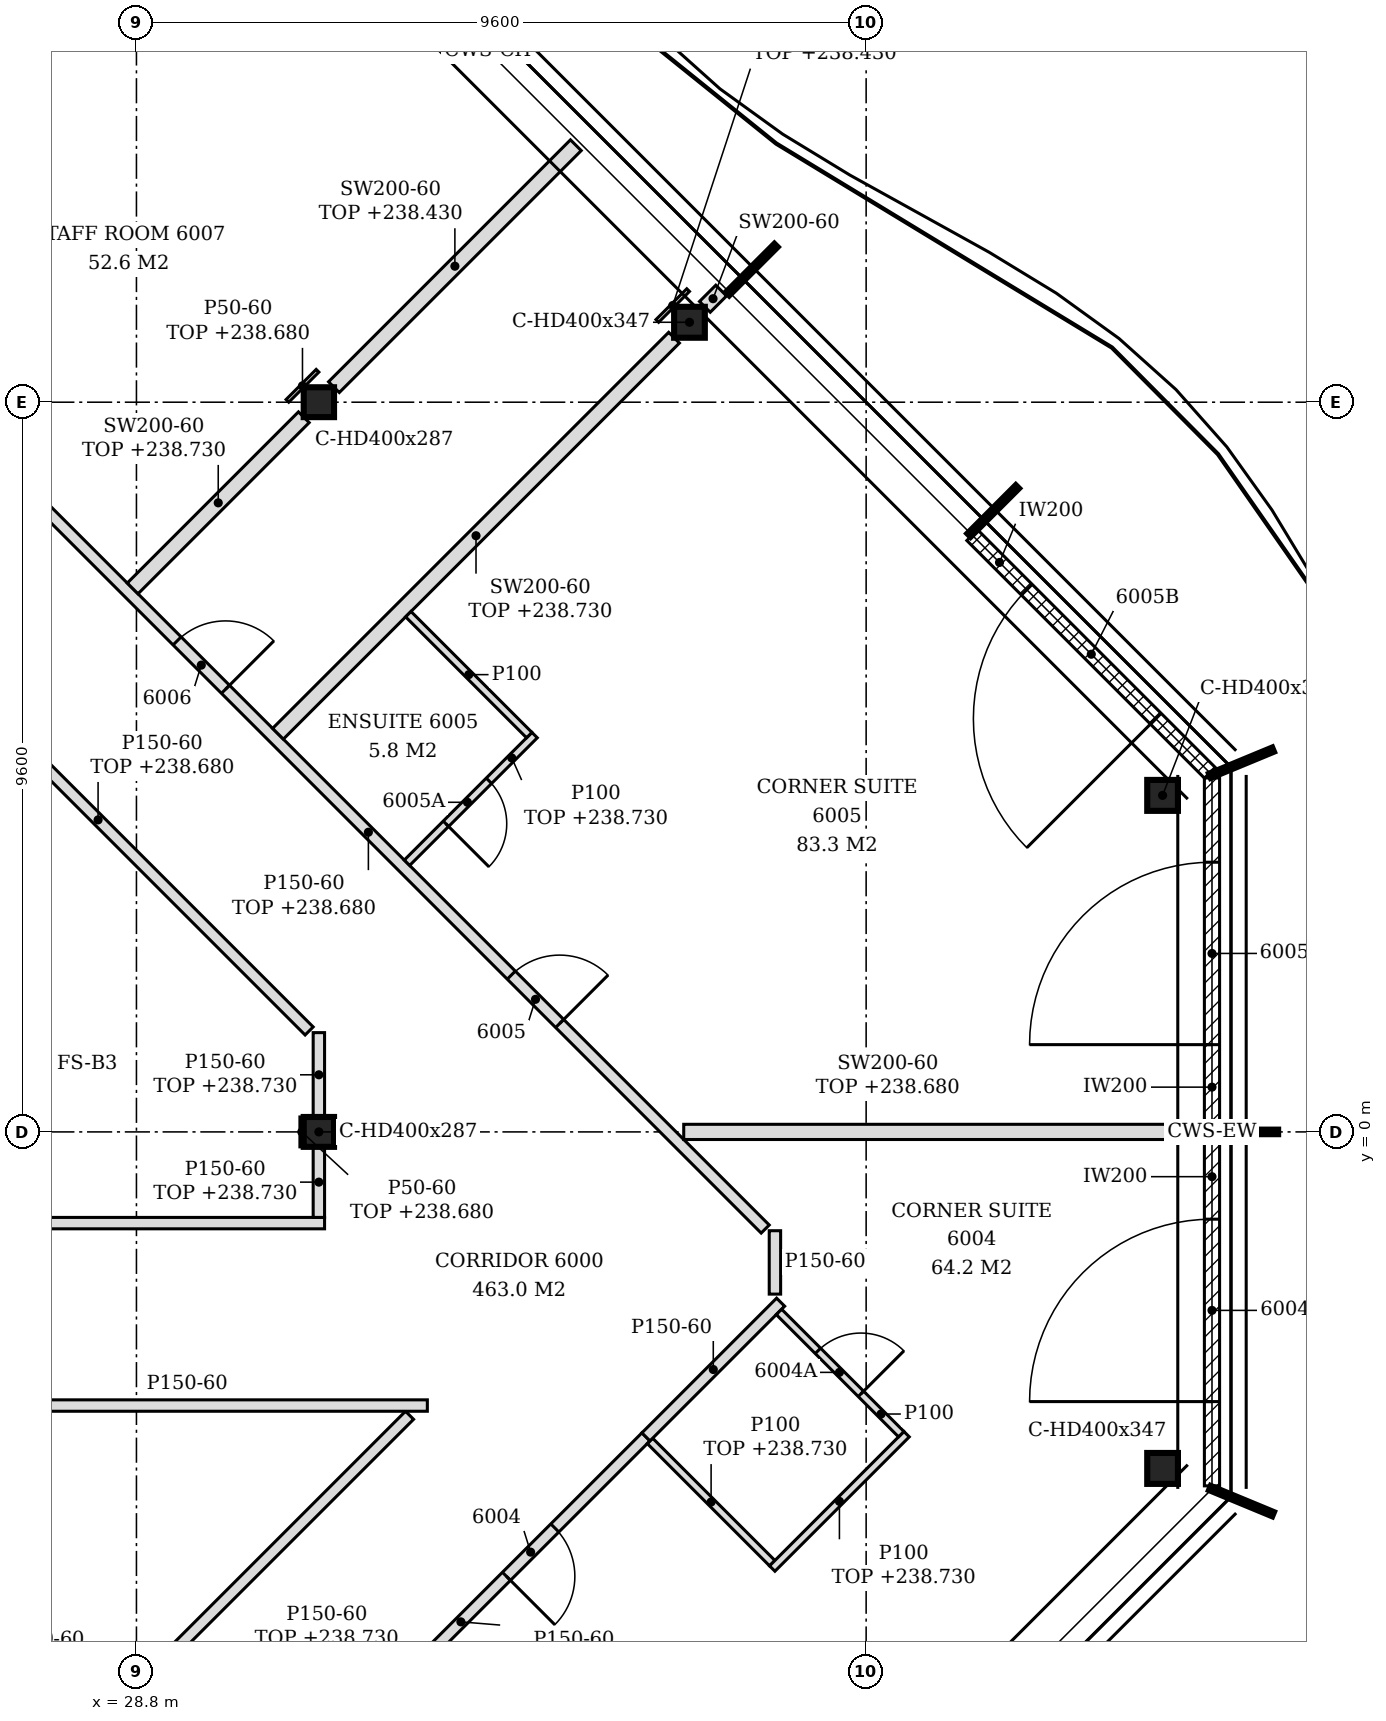
"""IFC4 building model, lengths in metres.
Left out: names, types, materials, properties, quantities, classifications, styles, units other than length and angle.
Written with IfcOpenShell. Run it as: python <this file> out.ifc"""

import sys

from ifc_helpers import new_model, si_unit, direction, frame, frame_2d, origin, origin_2d, place, context, subcontext, project, spatial, polyline, rectangle, i_section, outline, extrude, element, fill, save


model = new_model("IFC4")
c1 = context("Model", 3, precision=1e-05, world=origin(), true_north=direction((0.0, 1.0)))
c2 = subcontext(c1, "Body", "Model", "MODEL_VIEW")
j1 = project(units=[si_unit("LENGTHUNIT", "METRE"), si_unit("PLANEANGLEUNIT", "RADIAN")], contexts=[c1])
p1 = place(None, origin())
s1 = spatial("IfcSite", under=j1, at=p1, CompositionType="ELEMENT")
p2 = place(p1, origin())
s2 = spatial("IfcBuilding", under=s1, at=p2, CompositionType="ELEMENT")
p3 = place(p2, frame((0.0, 0.0, 235.8)))
s3 = spatial("IfcBuildingStorey", under=s2, at=p3, CompositionType="ELEMENT", Elevation=235.8)
for number, where, z_axis, x_axis in (
    (1, (42.3, -4.427, -0.15), (0.0, 0.0, 1.0), (1.0, 0.0, 0.0)),
    (2, (42.3, 4.427, -0.15), (0.0, 0.0, 1.0), (1.0, 0.0, 0.0)),
    (3, (36.076, 10.652, -0.15), (0.0, 0.0, 1.0), (1.0, 0.0, 0.0)),
):
    element("IfcColumn", number, at=place(p3, frame(where, z_axis=z_axis, x_axis=x_axis)), inside=s3, PredefinedType="COLUMN", context=c2, shape_type="SweptSolid", body=[
        extrude(i_section(OverallWidth=0.404, OverallDepth=0.407, WebThickness=0.027, FlangeThickness=0.044, FilletRadius=0.015, at=origin_2d()), origin(), (0.0, 0.0, 1.0), 3.6),
    ])
for number, where, z_axis, x_axis in (
    (4, (31.2, 0.0, -0.15), (0.0, 0.0, 1.0), (1.0, 0.0, 0.0)),
    (5, (31.2, 9.6, -0.15), (0.0, 0.0, 1.0), (1.0, 0.0, 0.0)),
):
    element("IfcColumn", number, at=place(p3, frame(where, z_axis=z_axis, x_axis=x_axis)), inside=s3, PredefinedType="COLUMN", context=c2, shape_type="SweptSolid", body=[
        extrude(i_section(OverallWidth=0.399, OverallDepth=0.393, WebThickness=0.023, FlangeThickness=0.037, FilletRadius=0.015, at=origin_2d()), origin(), (0.0, 0.0, 1.0), 3.6),
    ])
p4 = place(p3, frame((42.95, -4.656, 0.0), z_axis=(0.0, 0.0, 1.0), x_axis=(0.0, 1.0, 0.0)))
e6 = element("IfcWall", 6, at=p4, inside=s3, PredefinedType="NOTDEFINED", context=c2, shape_type="SweptSolid", body=[
    extrude(rectangle(XDim=4.626, YDim=0.2, at=frame_2d((2.313, 0.0))), origin(), (0.0, 0.0, 1.0), 3.45),
])
p5 = place(p4, frame((1.108, 0.0, 0.0)))
e7 = element("IfcOpeningElement", 7, at=p5, cuts=e6, PredefinedType="OPENING", context=c2, shape_type="SweptSolid", body=[
    extrude(rectangle(XDim=2.4, YDim=2.4, at=frame_2d((1.2, 1.2))), frame((0.0, 0.11, 0.0), z_axis=(0.0, -1.0, 0.0), x_axis=(1.0, 0.0, 0.0)), (0.0, 0.0, 1.0), 0.22),
])
p6 = place(p3, frame((42.95, 0.03, 0.0), z_axis=(0.0, 0.0, 1.0), x_axis=(0.0, 1.0, 0.0)))
e8 = element("IfcWall", 8, at=p6, inside=s3, PredefinedType="NOTDEFINED", context=c2, shape_type="SweptSolid", body=[
    extrude(rectangle(XDim=4.626, YDim=0.2, at=frame_2d((2.313, 0.0))), origin(), (0.0, 0.0, 1.0), 3.45),
])
p7 = place(p6, frame((1.118, 0.0, 0.0)))
e9 = element("IfcOpeningElement", 9, at=p7, cuts=e8, PredefinedType="OPENING", context=c2, shape_type="SweptSolid", body=[
    extrude(rectangle(XDim=2.4, YDim=2.4, at=frame_2d((1.2, 1.2))), frame((0.0, 0.11, 0.0), z_axis=(0.0, -1.0, 0.0), x_axis=(1.0, 0.0, 0.0)), (0.0, 0.0, 1.0), 0.22),
])
p8 = place(p3, frame((42.922, 4.725, 0.0), z_axis=(0.0, 0.0, 1.0), x_axis=(-0.707079168996, 0.707134392299, 0.0)))
e10 = element("IfcWall", 10, at=p8, inside=s3, PredefinedType="NOTDEFINED", context=c2, shape_type="SweptSolid", body=[
    extrude(rectangle(XDim=4.421, YDim=0.2, at=frame_2d((2.21, 0.0))), origin(), (0.0, 0.0, 1.0), 3.45),
])
p9 = place(p8, frame((1.005, 0.0, 0.0)))
e11 = element("IfcOpeningElement", 11, at=p9, cuts=e10, PredefinedType="OPENING", context=c2, shape_type="SweptSolid", body=[
    extrude(rectangle(XDim=2.4, YDim=2.4, at=frame_2d((1.2, 1.2))), frame((0.0, 0.11, 0.0), z_axis=(0.0, -1.0, 0.0), x_axis=(1.0, 0.0, 0.0)), (0.0, 0.0, 1.0), 0.22),
])
p10 = place(p3, frame((24.468, -11.653, 0.0), z_axis=(0.0, 0.0, 1.0), x_axis=(0.707095889299, 0.707117672906, 0.0)))
e12 = element("IfcWall", 12, at=p10, inside=s3, PredefinedType="PARTITIONING", context=c2, shape_type="SweptSolid", body=[
    extrude(rectangle(XDim=11.208, YDim=0.15, at=frame_2d((5.604, 0.0))), origin(), (0.0, 0.0, 1.0), 2.88),
])
p11 = place(p3, frame((32.469, -7.045, 0.0), z_axis=(0.0, 0.0, 1.0), x_axis=(0.70722059203, 0.706992952022, 0.0)))
e13 = element("IfcWall", 13, at=p11, inside=s3, PredefinedType="PARTITIONING", context=c2, shape_type="SweptSolid", body=[
    extrude(rectangle(XDim=4.29, YDim=0.15, at=frame_2d((2.145, 0.0))), origin(), (0.0, 0.0, 1.0), 2.93),
])
p12 = place(p11, frame((1.695, 0.0, 0.0)))
e14 = element("IfcOpeningElement", 14, at=p12, cuts=e13, PredefinedType="OPENING", context=c2, shape_type="SweptSolid", body=[
    extrude(rectangle(XDim=0.9, YDim=2.1, at=frame_2d((0.45, 1.05))), frame((0.0, 0.085, 0.0), z_axis=(0.0, -1.0, 0.0), x_axis=(1.0, 0.0, 0.0)), (0.0, 0.0, 1.0), 0.17),
])
p13 = place(p3, frame((37.165, -5.674, 0.0), z_axis=(0.0, 0.0, 1.0), x_axis=(-0.707106781187, 0.707106781187, 0.0)))
e15 = element("IfcWall", 15, at=p13, inside=s3, PredefinedType="PARTITIONING", context=c2, shape_type="SweptSolid", body=[
    extrude(rectangle(XDim=2.275, YDim=0.1, at=frame_2d((1.137, 0.0))), origin(), (0.0, 0.0, 1.0), 2.93),
])
p14 = place(p3, frame((37.165, -5.744, 0.0), z_axis=(0.0, 0.0, 1.0), x_axis=(0.707155609469, 0.707057949532, 0.0)))
e16 = element("IfcWall", 16, at=p14, inside=s3, PredefinedType="PARTITIONING", context=c2, shape_type="SweptSolid", body=[
    extrude(rectangle(XDim=2.5, YDim=0.1, at=frame_2d((1.25, 0.0))), origin(), (0.0, 0.0, 1.0), 2.93),
])
p15 = place(p3, frame((35.503, -4.012, 0.0), z_axis=(0.0, 0.0, 1.0), x_axis=(0.707106781187, 0.707106781187, 0.0)))
e17 = element("IfcWall", 17, at=p15, inside=s3, PredefinedType="PARTITIONING", context=c2, shape_type="SweptSolid", body=[
    extrude(rectangle(XDim=2.506, YDim=0.15, at=frame_2d((1.253, 0.0))), origin(), (0.0, 0.0, 1.0), 3.45),
])
p16 = place(p3, frame((38.862, -3.977, 0.0), z_axis=(0.0, 0.0, 1.0), x_axis=(-0.707106781187, 0.707106781187, 0.0)))
e18 = element("IfcWall", 18, at=p16, inside=s3, PredefinedType="PARTITIONING", context=c2, shape_type="SweptSolid", body=[
    extrude(rectangle(XDim=2.275, YDim=0.1, at=frame_2d((1.137, 0.0))), origin(), (0.0, 0.0, 1.0), 3.45),
])
p17 = place(p16, frame((0.75, 0.0, 0.0)))
e19 = element("IfcOpeningElement", 19, at=p17, cuts=e18, PredefinedType="OPENING", context=c2, shape_type="SweptSolid", body=[
    extrude(rectangle(XDim=0.8, YDim=2.1, at=frame_2d((0.4, 1.05))), frame((0.0, 0.06, 0.0), z_axis=(0.0, -1.0, 0.0), x_axis=(1.0, 0.0, 0.0)), (0.0, 0.0, 1.0), 0.12),
])
p18 = place(p3, frame((19.125, -3.6, 0.0), z_axis=(0.0, 0.0, 1.0), x_axis=(1.0, 0.0, 0.0)))
e20 = element("IfcWall", 20, at=p18, inside=s3, PredefinedType="PARTITIONING", context=c2, shape_type="SweptSolid", body=[
    extrude(outline(polyline([(0.0, 0.0), (13.502, 0.0), (13.502, 3.45), (12.225, 3.45), (12.223, 2.93), (11.925, 2.93), (11.923, 3.45), (0.225, 3.45), (0.223, 2.83), (0.0, 2.83), (0.0, 0.0)])), frame((0.0, 0.075, 0.0), z_axis=(0.0, -1.0, 0.0), x_axis=(1.0, 0.0, 0.0)), (0.0, 0.0, 1.0), 0.15),
])
p19 = place(p18, frame((6.286, 0.0, 0.0)))
e21 = element("IfcOpeningElement", 21, at=p19, cuts=e20, PredefinedType="OPENING", context=c2, shape_type="SweptSolid", body=[
    extrude(rectangle(XDim=0.9, YDim=2.1, at=frame_2d((0.45, 1.05))), frame((0.0, 0.085, 0.0), z_axis=(0.0, -1.0, 0.0), x_axis=(1.0, 0.0, 0.0)), (0.0, 0.0, 1.0), 0.17),
])
p20 = place(p3, frame((37.2, -2.134, 0.0), z_axis=(0.0, 0.0, 1.0), x_axis=(0.0, 1.0, 0.0)))
e22 = element("IfcWall", 22, at=p20, inside=s3, PredefinedType="PARTITIONING", context=c2, shape_type="SweptSolid", body=[
    extrude(rectangle(XDim=0.834, YDim=0.15, at=frame_2d((0.417, 0.0))), origin(), (0.0, 0.0, 1.0), 3.45),
])
p21 = place(p3, frame((37.072, -1.278, 0.0), z_axis=(0.0, 0.0, 1.0), x_axis=(-0.707106781187, 0.707106781187, 0.0)))
e23 = element("IfcWall", 23, at=p21, inside=s3, PredefinedType="PARTITIONING", context=c2, shape_type="SweptSolid", body=[
    extrude(rectangle(XDim=20.294, YDim=0.15, at=frame_2d((10.147, 0.0))), origin(), (0.0, 0.0, 1.0), 2.88),
])
p22 = place(p21, frame((3.824, 0.0, 0.0)))
e24 = element("IfcOpeningElement", 24, at=p22, cuts=e23, PredefinedType="OPENING", context=c2, shape_type="SweptSolid", body=[
    extrude(rectangle(XDim=0.9, YDim=2.1, at=frame_2d((0.45, 1.05))), frame((0.0, 0.085, 0.0), z_axis=(0.0, -1.0, 0.0), x_axis=(1.0, 0.0, 0.0)), (0.0, 0.0, 1.0), 0.17),
])
p23 = place(p21, frame((10.042, 0.0, 0.0)))
e25 = element("IfcOpeningElement", 25, at=p23, cuts=e23, PredefinedType="OPENING", context=c2, shape_type="SweptSolid", body=[
    extrude(rectangle(XDim=0.9, YDim=2.1, at=frame_2d((0.45, 1.05))), frame((0.0, 0.085, 0.0), z_axis=(0.0, -1.0, 0.0), x_axis=(1.0, 0.0, 0.0)), (0.0, 0.0, 1.0), 0.17),
])
p24 = place(p21, frame((14.443, 0.0, 0.0)))
e26 = element("IfcOpeningElement", 26, at=p24, cuts=e23, PredefinedType="OPENING", context=c2, shape_type="SweptSolid", body=[
    extrude(rectangle(XDim=0.9, YDim=2.1, at=frame_2d((0.45, 1.05))), frame((0.0, 0.085, 0.0), z_axis=(0.0, -1.0, 0.0), x_axis=(1.0, 0.0, 0.0)), (0.0, 0.0, 1.0), 0.17),
])
p25 = place(p3, frame((19.125, -1.2, 0.0), z_axis=(0.0, 0.0, 1.0), x_axis=(1.0, 0.0, 0.0)))
e27 = element("IfcWall", 27, at=p25, inside=s3, PredefinedType="PARTITIONING", context=c2, shape_type="SweptSolid", body=[
    extrude(outline(polyline([(0.0, 0.0), (12.15, 0.0), (12.15, 2.93), (11.925, 2.93), (11.923, 3.45), (0.225, 3.45), (0.223, 2.83), (0.0, 2.83), (0.0, 0.0)])), frame((0.0, 0.075, 0.0), z_axis=(0.0, -1.0, 0.0), x_axis=(1.0, 0.0, 0.0)), (0.0, 0.0, 1.0), 0.15),
])
p26 = place(p3, frame((31.2, -1.125, 0.0), z_axis=(0.0, 0.0, 1.0), x_axis=(0.0, 1.0, 0.0)))
e28 = element("IfcWall", 28, at=p26, inside=s3, PredefinedType="PARTITIONING", context=c2, shape_type="SweptSolid", body=[
    extrude(rectangle(XDim=0.928, YDim=0.15, at=frame_2d((0.464, 0.0))), origin(), (0.0, 0.0, 1.0), 2.93),
])
p27 = place(p3, frame((36.0, 0.0, 0.0), z_axis=(0.0, 0.0, 1.0), x_axis=(1.0, 0.0, 0.0)))
e29 = element("IfcWall", 29, at=p27, inside=s3, PredefinedType="PARTITIONING", context=c2, shape_type="SweptSolid", body=[
    extrude(rectangle(XDim=6.85, YDim=0.2, at=frame_2d((3.425, 0.0))), origin(), (0.0, 0.0, 1.0), 2.88),
])
p28 = place(p3, frame((31.2, 0.197, 0.0), z_axis=(0.0, 0.0, 1.0), x_axis=(0.0, 1.0, 0.0)))
e30 = element("IfcWall", 30, at=p28, inside=s3, PredefinedType="PARTITIONING", context=c2, shape_type="SweptSolid", body=[
    extrude(rectangle(XDim=1.11, YDim=0.15, at=frame_2d((0.555, 0.0))), origin(), (0.0, 0.0, 1.0), 2.93),
])
p29 = place(p3, frame((31.072, 1.328, 0.0), z_axis=(0.0, 0.0, 1.0), x_axis=(-0.707099390895, 0.707114171401, 0.0)))
e31 = element("IfcWall", 31, at=p29, inside=s3, PredefinedType="PARTITIONING", context=c2, shape_type="SweptSolid", body=[
    extrude(rectangle(XDim=16.518, YDim=0.15, at=frame_2d((8.259, 0.0))), origin(), (0.0, 0.0, 1.0), 2.88),
])
p30 = place(p29, frame((7.854, 0.0, 0.0)))
e32 = element("IfcOpeningElement", 32, at=p30, cuts=e31, PredefinedType="OPENING", context=c2, shape_type="SweptSolid", body=[
    extrude(rectangle(XDim=0.9, YDim=2.1, at=frame_2d((0.45, 1.05))), frame((0.0, 0.085, 0.0), z_axis=(0.0, -1.0, 0.0), x_axis=(1.0, 0.0, 0.0)), (0.0, 0.0, 1.0), 0.17),
])
p31 = place(p3, frame((32.359, 3.541, 0.0), z_axis=(0.0, 0.0, 1.0), x_axis=(0.707158179099, 0.707055379538, 0.0)))
e33 = element("IfcWall", 33, at=p31, inside=s3, PredefinedType="PARTITIONING", context=c2, shape_type="SweptSolid", body=[
    extrude(rectangle(XDim=2.375, YDim=0.1, at=frame_2d((1.188, 0.0))), origin(), (0.0, 0.0, 1.0), 2.93),
])
p32 = place(p31, frame((0.725, 0.0, 0.0)))
e34 = element("IfcOpeningElement", 34, at=p32, cuts=e33, PredefinedType="OPENING", context=c2, shape_type="SweptSolid", body=[
    extrude(rectangle(XDim=0.8, YDim=2.1, at=frame_2d((0.4, 1.05))), frame((0.0, 0.06, 0.0), z_axis=(0.0, -1.0, 0.0), x_axis=(1.0, 0.0, 0.0)), (0.0, 0.0, 1.0), 0.12),
])
p33 = place(p3, frame((30.662, 5.238, 0.0), z_axis=(0.0, 0.0, 1.0), x_axis=(0.707106781187, 0.707106781187, 0.0)))
e35 = element("IfcWall", 35, at=p33, inside=s3, PredefinedType="PARTITIONING", context=c2, shape_type="SweptSolid", body=[
    extrude(rectangle(XDim=7.369, YDim=0.2, at=frame_2d((3.685, 0.0))), origin(), (0.0, 0.0, 1.0), 2.93),
])
p34 = place(p3, frame((33.968, 5.22, 0.0), z_axis=(0.0, 0.0, 1.0), x_axis=(-0.707106781187, 0.707106781187, 0.0)))
e36 = element("IfcWall", 36, at=p34, inside=s3, PredefinedType="PARTITIONING", context=c2, shape_type="SweptSolid", body=[
    extrude(rectangle(XDim=2.25, YDim=0.1, at=frame_2d((1.125, 0.0))), origin(), (0.0, 0.0, 1.0), 3.45),
])
p35 = place(p3, frame((28.75, 7.15, 0.0), z_axis=(0.0, 0.0, 1.0), x_axis=(0.7070684525, 0.707145107796, 0.0)))
e37 = element("IfcWall", 37, at=p35, inside=s3, PredefinedType="PARTITIONING", context=c2, shape_type="SweptSolid", body=[
    extrude(rectangle(XDim=3.185, YDim=0.2, at=frame_2d((1.592, 0.0))), origin(), (0.0, 0.0, 1.0), 2.93),
])
p36 = place(p3, frame((31.398, 9.798, 0.0), z_axis=(0.0, 0.0, 1.0), x_axis=(0.707133900936, 0.707079660397, 0.0)))
e38 = element("IfcWall", 38, at=p36, inside=s3, PredefinedType="PARTITIONING", context=c2, shape_type="SweptSolid", body=[
    extrude(rectangle(XDim=4.501, YDim=0.2, at=frame_2d((2.25, 0.0))), origin(), (0.0, 0.0, 1.0), 2.63),
])
p37 = place(p3, frame((36.278, 10.854, 0.0), z_axis=(0.0, 0.0, 1.0), x_axis=(0.707509117806, 0.706704215511, 0.0)))
e39 = element("IfcWall", 39, at=p37, inside=s3, PredefinedType="PARTITIONING", context=c2, shape_type="SweptSolid", body=[
    extrude(rectangle(XDim=0.303, YDim=0.2, at=frame_2d((0.152, 0.0))), origin(), (0.0, 0.0, 1.0), 3.45),
])
p38 = place(p3, frame((24.438, 11.462, 0.0), z_axis=(0.0, 0.0, 1.0), x_axis=(0.707090216072, 0.707123345913, 0.0)))
e40 = element("IfcWall", 40, at=p38, inside=s3, PredefinedType="PARTITIONING", context=c2, shape_type="SweptSolid", body=[
    extrude(rectangle(XDim=7.369, YDim=0.2, at=frame_2d((3.685, 0.0))), origin(), (0.0, 0.0, 1.0), 2.88),
])
p39 = place(p3, frame((30.976, -0.197, 0.0), z_axis=(0.0, 0.0, 1.0), x_axis=(0.0, 1.0, 0.0)))
e41 = element("IfcWall", 41, at=p39, inside=s3, PredefinedType="PARTITIONING", context=c2, shape_type="SweptSolid", body=[
    extrude(rectangle(XDim=0.393, YDim=0.05, at=frame_2d((0.197, 0.0))), origin(), (0.0, 0.0, 1.0), 2.88),
])
p40 = place(p3, frame((35.653, 10.669, 0.0), z_axis=(0.0, 0.0, 1.0), x_axis=(0.707106781187, 0.707106781187, 0.0)))
e42 = element("IfcWall", 42, at=p40, inside=s3, PredefinedType="PARTITIONING", context=c2, shape_type="SweptSolid", body=[
    extrude(rectangle(XDim=0.573, YDim=0.05, at=frame_2d((0.287, 0.0))), origin(), (0.0, 0.0, 1.0), 2.63),
])
p41 = place(p3, frame((30.786, 9.618, 0.0), z_axis=(0.0, 0.0, 1.0), x_axis=(0.707106781187, 0.707106781187, 0.0)))
e43 = element("IfcWall", 43, at=p41, inside=s3, PredefinedType="PARTITIONING", context=c2, shape_type="SweptSolid", body=[
    extrude(rectangle(XDim=0.56, YDim=0.05, at=frame_2d((0.28, 0.0))), origin(), (0.0, 0.0, 1.0), 2.88),
])
p42 = place(p5, origin())
e44 = element("IfcDoor", 44, at=p42, inside=s3, OperationType="SINGLE_SWING_LEFT", PredefinedType="DOOR", context=c2, shape_type="SweptSolid", body=[
    extrude(rectangle(XDim=2.4, YDim=2.4, at=frame_2d((1.2, 1.2))), frame((0.0, 0.025, 0.0), z_axis=(0.0, -1.0, 0.0), x_axis=(1.0, 0.0, 0.0)), (0.0, 0.0, 1.0), 0.05),
])
fill(e7, e44)
p43 = place(p7, origin())
e45 = element("IfcDoor", 45, at=p43, inside=s3, OperationType="SINGLE_SWING_LEFT", PredefinedType="DOOR", context=c2, shape_type="SweptSolid", body=[
    extrude(rectangle(XDim=2.4, YDim=2.4, at=frame_2d((1.2, 1.2))), frame((0.0, 0.025, 0.0), z_axis=(0.0, -1.0, 0.0), x_axis=(1.0, 0.0, 0.0)), (0.0, 0.0, 1.0), 0.05),
])
fill(e9, e45)
p44 = place(p9, origin())
e46 = element("IfcDoor", 46, at=p44, inside=s3, OperationType="SINGLE_SWING_LEFT", PredefinedType="DOOR", context=c2, shape_type="SweptSolid", body=[
    extrude(rectangle(XDim=2.4, YDim=2.4, at=frame_2d((1.2, 1.2))), frame((0.0, 0.025, 0.0), z_axis=(0.0, -1.0, 0.0), x_axis=(1.0, 0.0, 0.0)), (0.0, 0.0, 1.0), 0.05),
])
fill(e11, e46)
p45 = place(p12, frame((0.9, 0.0, 0.0), z_axis=(0.0, 0.0, 1.0), x_axis=(-1.0, 0.0, 0.0)))
e47 = element("IfcDoor", 47, at=p45, inside=s3, OperationType="SINGLE_SWING_RIGHT", PredefinedType="DOOR", context=c2, shape_type="SweptSolid", body=[
    extrude(rectangle(XDim=0.9, YDim=2.1, at=frame_2d((0.45, 1.05))), frame((0.0, 0.025, 0.0), z_axis=(0.0, -1.0, 0.0), x_axis=(1.0, 0.0, 0.0)), (0.0, 0.0, 1.0), 0.05),
])
fill(e14, e47)
p46 = place(p17, frame((0.8, 0.0, 0.0), z_axis=(0.0, 0.0, 1.0), x_axis=(-1.0, 0.0, 0.0)))
e48 = element("IfcDoor", 48, at=p46, inside=s3, OperationType="SINGLE_SWING_RIGHT", PredefinedType="DOOR", context=c2, shape_type="SweptSolid", body=[
    extrude(rectangle(XDim=0.8, YDim=2.1, at=frame_2d((0.4, 1.05))), frame((0.0, 0.025, 0.0), z_axis=(0.0, -1.0, 0.0), x_axis=(1.0, 0.0, 0.0)), (0.0, 0.0, 1.0), 0.05),
])
fill(e19, e48)
p47 = place(p22, frame((0.9, 0.0, 0.0), z_axis=(0.0, 0.0, 1.0), x_axis=(-1.0, 0.0, 0.0)))
e49 = element("IfcDoor", 49, at=p47, inside=s3, OperationType="SINGLE_SWING_RIGHT", PredefinedType="DOOR", context=c2, shape_type="SweptSolid", body=[
    extrude(rectangle(XDim=0.9, YDim=2.1, at=frame_2d((0.45, 1.05))), frame((0.0, 0.025, 0.0), z_axis=(0.0, -1.0, 0.0), x_axis=(1.0, 0.0, 0.0)), (0.0, 0.0, 1.0), 0.05),
])
fill(e24, e49)
p48 = place(p32, frame((0.8, 0.0, 0.0), z_axis=(0.0, 0.0, 1.0), x_axis=(-1.0, 0.0, 0.0)))
e50 = element("IfcDoor", 50, at=p48, inside=s3, OperationType="SINGLE_SWING_RIGHT", PredefinedType="DOOR", context=c2, shape_type="SweptSolid", body=[
    extrude(rectangle(XDim=0.8, YDim=2.1, at=frame_2d((0.4, 1.05))), frame((0.0, 0.025, 0.0), z_axis=(0.0, -1.0, 0.0), x_axis=(1.0, 0.0, 0.0)), (0.0, 0.0, 1.0), 0.05),
])
fill(e34, e50)
p49 = place(p23, frame((0.9, 0.0, 0.0), z_axis=(0.0, 0.0, 1.0), x_axis=(-1.0, 0.0, 0.0)))
e51 = element("IfcDoor", 51, at=p49, inside=s3, OperationType="SINGLE_SWING_RIGHT", PredefinedType="DOOR", context=c2, shape_type="SweptSolid", body=[
    extrude(rectangle(XDim=0.9, YDim=2.1, at=frame_2d((0.45, 1.05))), frame((0.0, 0.025, 0.0), z_axis=(0.0, -1.0, 0.0), x_axis=(1.0, 0.0, 0.0)), (0.0, 0.0, 1.0), 0.05),
])
fill(e25, e51)
save(model, sys.argv[1])
